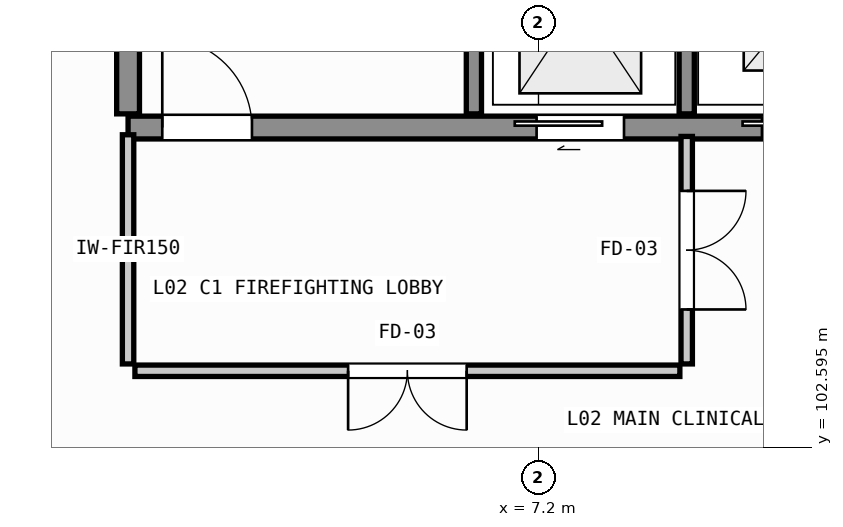
"""IFC4 building model, lengths in metres.
Left out: names, types, materials, properties, quantities, classifications, styles, units other than length and angle.
Written with IfcOpenShell. Run it as: python <this file> out.ifc"""

import sys

from ifc_helpers import new_model, si_unit, direction, frame, frame_2d, origin, place, context, subcontext, project, spatial, rectangle, extrude, element, fill, save


model = new_model("IFC4")
c1 = context("Model", 3, precision=1e-05, world=origin(), true_north=direction((0.0, 1.0)))
c2 = subcontext(c1, "Body", "Model", "MODEL_VIEW")
j1 = project(units=[si_unit("LENGTHUNIT", "METRE"), si_unit("PLANEANGLEUNIT", "RADIAN")], contexts=[c1])
p1 = place(None, origin())
s1 = spatial("IfcSite", under=j1, at=p1, CompositionType="ELEMENT")
p2 = place(p1, origin())
s2 = spatial("IfcBuilding", under=s1, at=p2, CompositionType="ELEMENT")
p3 = place(p2, frame((0.0, 0.0, 4.8)))
s3 = spatial("IfcBuildingStorey", under=s2, at=p3, CompositionType="ELEMENT", Elevation=4.8)
p4 = place(p3, frame((1.8, 106.8, 0.0), z_axis=(0.0, 0.0, 1.0), x_axis=(1.0, 0.0, 0.0)))
e1 = element("IfcWall", 1, at=p4, inside=s3, PredefinedType="SHEAR", context=c2, shape_type="SweptSolid", body=[
    extrude(rectangle(XDim=10.8, YDim=0.3, at=frame_2d((5.4, 0.0))), origin(), (0.0, 0.0, 1.0), 4.5),
])
p5 = place(p4, frame((0.45, 0.0, 0.0)))
e2 = element("IfcOpeningElement", 2, at=p5, cuts=e1, PredefinedType="OPENING", context=c2, shape_type="SweptSolid", body=[
    extrude(rectangle(XDim=1.18, YDim=2.16, at=frame_2d((0.59, 1.08))), frame((0.0, 0.16, 0.0), z_axis=(0.0, -1.0, 0.0), x_axis=(1.0, 0.0, 0.0)), (0.0, 0.0, 1.0), 0.32),
])
p6 = place(p4, frame((5.375, 0.0, 0.0)))
e3 = element("IfcOpeningElement", 3, at=p6, cuts=e1, PredefinedType="OPENING", context=c2, shape_type="SweptSolid", body=[
    extrude(rectangle(XDim=1.15, YDim=2.15, at=frame_2d((0.575, 1.075))), frame((0.0, 0.16, 0.0), z_axis=(0.0, -1.0, 0.0), x_axis=(1.0, 0.0, 0.0)), (0.0, 0.0, 1.0), 0.32),
])
p7 = place(p4, frame((8.34, 0.0, 0.0)))
e4 = element("IfcOpeningElement", 4, at=p7, cuts=e1, PredefinedType="OPENING", context=c2, shape_type="SweptSolid", body=[
    extrude(rectangle(XDim=1.02, YDim=2.12, at=frame_2d((0.51, 1.06))), frame((0.0, 0.16, 0.0), z_axis=(0.0, -1.0, 0.0), x_axis=(1.0, 0.0, 0.0)), (0.0, 0.0, 1.0), 0.32),
])
p8 = place(p3, frame((1.8, 106.98, 0.0), z_axis=(0.0, 0.0, 1.0), x_axis=(0.0, 1.0, 0.0)))
e5 = element("IfcWall", 5, at=p8, inside=s3, PredefinedType="SHEAR", context=c2, shape_type="SweptSolid", body=[
    extrude(rectangle(XDim=6.24, YDim=0.3, at=frame_2d((3.12, 0.0))), origin(), (0.0, 0.0, 1.0), 4.5),
])
for number, where, z_axis, x_axis in (
    (6, (6.35, 106.98, 0.0), (0.0, 0.0, 1.0), (0.0, 1.0, 0.0)),
    (7, (9.15, 106.98, 0.0), (0.0, 0.0, 1.0), (0.0, 1.0, 0.0)),
):
    element("IfcWall", number, at=place(p3, frame(where, z_axis=z_axis, x_axis=x_axis)), inside=s3, PredefinedType="SHEAR", context=c2, shape_type="SweptSolid", body=[
        extrude(rectangle(XDim=3.15, YDim=0.2, at=frame_2d((1.575, 0.0))), origin(), (0.0, 0.0, 1.0), 4.5),
    ])
p9 = place(p3, frame((1.8, 103.69, 0.0), z_axis=(0.0, 0.0, 1.0), x_axis=(0.0, 1.0, 0.0)))
e8 = element("IfcWall", 8, at=p9, inside=s3, PredefinedType="PARTITIONING", context=c2, shape_type="SweptSolid", body=[
    extrude(rectangle(XDim=3.015, YDim=0.15, at=frame_2d((1.508, 0.0))), origin(), (0.0, 0.0, 1.0), 4.2),
])
p10 = place(p3, frame((9.15, 106.683, 0.0), z_axis=(0.0, 0.0, 1.0), x_axis=(0.0, -1.0, 0.0)))
e9 = element("IfcWall", 9, at=p10, inside=s3, PredefinedType="PARTITIONING", context=c2, shape_type="SweptSolid", body=[
    extrude(rectangle(XDim=2.993, YDim=0.15, at=frame_2d((1.497, 0.0))), origin(), (0.0, 0.0, 1.0), 4.2),
])
p11 = place(p10, frame((0.717, 0.0, 0.0)))
e10 = element("IfcOpeningElement", 10, at=p11, cuts=e9, PredefinedType="OPENING", context=c2, shape_type="SweptSolid", body=[
    extrude(rectangle(XDim=1.56, YDim=2.22, at=frame_2d((0.78, 1.11))), frame((0.0, 0.085, 0.0), z_axis=(0.0, -1.0, 0.0), x_axis=(1.0, 0.0, 0.0)), (0.0, 0.0, 1.0), 0.17),
])
p12 = place(p3, frame((9.06, 103.6, 0.0), z_axis=(0.0, 0.0, 1.0), x_axis=(-1.0, 0.0, 0.0)))
e11 = element("IfcWall", 11, at=p12, inside=s3, PredefinedType="PARTITIONING", context=c2, shape_type="SweptSolid", body=[
    extrude(rectangle(XDim=7.17, YDim=0.15, at=frame_2d((3.585, 0.0))), origin(), (0.0, 0.0, 1.0), 4.2),
])
p13 = place(p12, frame((2.805, 0.0, 0.0)))
e12 = element("IfcOpeningElement", 12, at=p13, cuts=e11, PredefinedType="OPENING", context=c2, shape_type="SweptSolid", body=[
    extrude(rectangle(XDim=1.56, YDim=2.22, at=frame_2d((0.78, 1.11))), frame((0.0, 0.085, 0.0), z_axis=(0.0, -1.0, 0.0), x_axis=(1.0, 0.0, 0.0)), (0.0, 0.0, 1.0), 0.17),
])
p14 = place(p5, origin())
e13 = element("IfcDoor", 13, at=p14, inside=s3, OperationType="SINGLE_SWING_LEFT", PredefinedType="DOOR", context=c2, shape_type="SweptSolid", body=[
    extrude(rectangle(XDim=1.18, YDim=2.16, at=frame_2d((0.59, 1.08))), frame((0.0, 0.025, 0.0), z_axis=(0.0, -1.0, 0.0), x_axis=(1.0, 0.0, 0.0)), (0.0, 0.0, 1.0), 0.05),
])
fill(e2, e13)
p15 = place(p6, origin())
e14 = element("IfcDoor", 14, at=p15, inside=s3, OperationType="DOUBLE_DOOR_SLIDING", PredefinedType="DOOR", context=c2, shape_type="SweptSolid", body=[
    extrude(rectangle(XDim=1.15, YDim=2.15, at=frame_2d((0.575, 1.075))), frame((0.0, 0.025, 0.0), z_axis=(0.0, -1.0, 0.0), x_axis=(1.0, 0.0, 0.0)), (0.0, 0.0, 1.0), 0.05),
])
fill(e3, e14)
p16 = place(p7, origin())
e15 = element("IfcDoor", 15, at=p16, inside=s3, OperationType="SLIDING_TO_LEFT", PredefinedType="DOOR", context=c2, shape_type="SweptSolid", body=[
    extrude(rectangle(XDim=1.02, YDim=2.12, at=frame_2d((0.51, 1.06))), frame((0.0, 0.025, 0.0), z_axis=(0.0, -1.0, 0.0), x_axis=(1.0, 0.0, 0.0)), (0.0, 0.0, 1.0), 0.05),
])
fill(e4, e15)
p17 = place(p11, origin())
e16 = element("IfcDoor", 16, at=p17, inside=s3, OperationType="DOUBLE_DOOR_SINGLE_SWING", PredefinedType="DOOR", context=c2, shape_type="SweptSolid", body=[
    extrude(rectangle(XDim=1.56, YDim=2.22, at=frame_2d((0.78, 1.11))), frame((0.0, 0.025, 0.0), z_axis=(0.0, -1.0, 0.0), x_axis=(1.0, 0.0, 0.0)), (0.0, 0.0, 1.0), 0.05),
])
fill(e10, e16)
p18 = place(p13, origin())
e17 = element("IfcDoor", 17, at=p18, inside=s3, OperationType="DOUBLE_DOOR_SINGLE_SWING", PredefinedType="DOOR", context=c2, shape_type="SweptSolid", body=[
    extrude(rectangle(XDim=1.56, YDim=2.22, at=frame_2d((0.78, 1.11))), frame((0.0, 0.025, 0.0), z_axis=(0.0, -1.0, 0.0), x_axis=(1.0, 0.0, 0.0)), (0.0, 0.0, 1.0), 0.05),
])
fill(e12, e17)
save(model, sys.argv[1])
